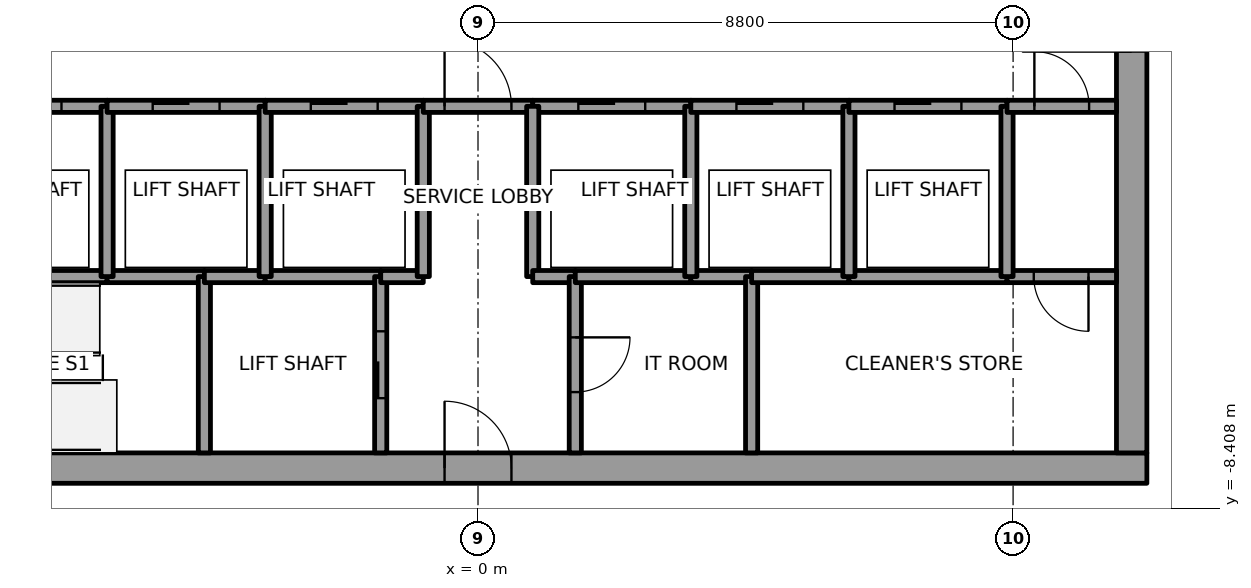
"""IFC4 building model, lengths in metres.
Left out: names, types, materials, properties, quantities, classifications, styles, units other than length and angle.
Written with IfcOpenShell. Run it as: python <this file> out.ifc"""

import sys

from ifc_helpers import new_model, si_unit, direction, frame, frame_2d, origin, place, context, subcontext, project, spatial, rectangle, extrude, element, fill, save


model = new_model("IFC4")
c1 = context("Model", 3, precision=1e-05, world=origin(), true_north=direction((0.0, 1.0)))
c2 = subcontext(c1, "Body", "Model", "MODEL_VIEW")
j1 = project(units=[si_unit("LENGTHUNIT", "METRE"), si_unit("PLANEANGLEUNIT", "RADIAN")], contexts=[c1])
p1 = place(None, origin())
s1 = spatial("IfcSite", under=j1, at=p1, CompositionType="ELEMENT")
p2 = place(p1, origin())
s2 = spatial("IfcBuilding", under=s1, at=p2, CompositionType="ELEMENT")
p3 = place(p2, frame((0.0, 0.0, 315.0)))
s3 = spatial("IfcBuildingStorey", under=s2, at=p3, CompositionType="ELEMENT", Elevation=315.0)
p4 = place(p3, frame((-11.0, -7.75, 0.0), z_axis=(0.0, 0.0, 1.0), x_axis=(1.0, 0.0, 0.0)))
e1 = element("IfcWall", 1, at=p4, inside=s3, PredefinedType="SHEAR", context=c2, shape_type="SweptSolid", body=[
    extrude(rectangle(XDim=22.0, YDim=0.5, at=frame_2d((11.0, 0.0))), origin(), (0.0, 0.0, 1.0), 4.0),
])
p5 = place(p4, frame((10.45, 0.0, 0.0)))
e2 = element("IfcOpeningElement", 2, at=p5, cuts=e1, PredefinedType="OPENING", context=c2, shape_type="SweptSolid", body=[
    extrude(rectangle(XDim=1.1, YDim=2.1, at=frame_2d((0.55, 1.05))), frame((0.0, 0.25, 0.0), z_axis=(0.0, -1.0, 0.0), x_axis=(1.0, 0.0, 0.0)), (0.0, 0.0, 1.0), 0.5),
])
p6 = place(p3, frame((10.75, -7.5, 0.0), z_axis=(0.0, 0.0, 1.0), x_axis=(0.0, 1.0, 0.0)))
e3 = element("IfcWall", 3, at=p6, inside=s3, PredefinedType="SHEAR", context=c2, shape_type="SweptSolid", body=[
    extrude(rectangle(XDim=15.0, YDim=0.5, at=frame_2d((7.5, 0.0))), origin(), (0.0, 0.0, 1.0), 4.0),
])
p7 = place(p6, frame((6.6, 0.0, 0.0)))
e4 = element("IfcOpeningElement", 4, at=p7, cuts=e3, PredefinedType="OPENING", context=c2, shape_type="SweptSolid", body=[
    extrude(rectangle(XDim=1.8, YDim=2.1, at=frame_2d((0.9, 1.05))), frame((0.0, 0.25, 0.0), z_axis=(0.0, -1.0, 0.0), x_axis=(1.0, 0.0, 0.0)), (0.0, 0.0, 1.0), 0.5),
])
p8 = place(p3, frame((-8.7, -4.6, 0.0), z_axis=(0.0, 0.0, 1.0), x_axis=(1.0, 0.0, 0.0)))
e5 = element("IfcWall", 5, at=p8, inside=s3, PredefinedType="SOLIDWALL", context=c2, shape_type="SweptSolid", body=[
    extrude(rectangle(XDim=2.6, YDim=0.2, at=frame_2d((1.3, 0.0))), origin(), (0.0, 0.0, 1.0), 3.85),
])
p9 = place(p3, frame((-8.7, -1.8, 0.0), z_axis=(0.0, 0.0, 1.0), x_axis=(1.0, 0.0, 0.0)))
e6 = element("IfcWall", 6, at=p9, inside=s3, PredefinedType="SOLIDWALL", context=c2, shape_type="SweptSolid", body=[
    extrude(rectangle(XDim=2.6, YDim=0.2, at=frame_2d((1.3, 0.0))), origin(), (0.0, 0.0, 1.0), 3.85),
])
p10 = place(p9, frame((0.75, 0.0, 0.0)))
e7 = element("IfcOpeningElement", 7, at=p10, cuts=e6, PredefinedType="OPENING", context=c2, shape_type="SweptSolid", body=[
    extrude(rectangle(XDim=1.1, YDim=2.1, at=frame_2d((0.55, 1.05))), frame((0.0, 0.1, 0.0), z_axis=(0.0, -1.0, 0.0), x_axis=(1.0, 0.0, 0.0)), (0.0, 0.0, 1.0), 0.2),
])
p11 = place(p3, frame((-6.1, -4.6, 0.0), z_axis=(0.0, 0.0, 1.0), x_axis=(1.0, 0.0, 0.0)))
e8 = element("IfcWall", 8, at=p11, inside=s3, PredefinedType="SOLIDWALL", context=c2, shape_type="SweptSolid", body=[
    extrude(rectangle(XDim=1.6, YDim=0.2, at=frame_2d((0.8, 0.0))), origin(), (0.0, 0.0, 1.0), 3.85),
])
p12 = place(p3, frame((-6.1, -4.6, 0.0), z_axis=(0.0, 0.0, 1.0), x_axis=(0.0, 1.0, 0.0)))
e9 = element("IfcWall", 9, at=p12, inside=s3, PredefinedType="SOLIDWALL", context=c2, shape_type="SweptSolid", body=[
    extrude(rectangle(XDim=2.8, YDim=0.2, at=frame_2d((1.4, 0.0))), origin(), (0.0, 0.0, 1.0), 3.85),
])
p13 = place(p3, frame((-6.1, -1.8, 0.0), z_axis=(0.0, 0.0, 1.0), x_axis=(1.0, 0.0, 0.0)))
e10 = element("IfcWall", 10, at=p13, inside=s3, PredefinedType="SOLIDWALL", context=c2, shape_type="SweptSolid", body=[
    extrude(rectangle(XDim=2.6, YDim=0.2, at=frame_2d((1.3, 0.0))), origin(), (0.0, 0.0, 1.0), 3.85),
])
p14 = place(p13, frame((0.75, 0.0, 0.0)))
e11 = element("IfcOpeningElement", 11, at=p14, cuts=e10, PredefinedType="OPENING", context=c2, shape_type="SweptSolid", body=[
    extrude(rectangle(XDim=1.1, YDim=2.1, at=frame_2d((0.55, 1.05))), frame((0.0, 0.1, 0.0), z_axis=(0.0, -1.0, 0.0), x_axis=(1.0, 0.0, 0.0)), (0.0, 0.0, 1.0), 0.2),
])
p15 = place(p3, frame((-4.5, -4.6, 0.0), z_axis=(0.0, 0.0, 1.0), x_axis=(0.0, -1.0, 0.0)))
e12 = element("IfcWall", 12, at=p15, inside=s3, PredefinedType="SOLIDWALL", context=c2, shape_type="SweptSolid", body=[
    extrude(rectangle(XDim=2.9, YDim=0.2, at=frame_2d((1.45, 0.0))), origin(), (0.0, 0.0, 1.0), 3.85),
])
p16 = place(p3, frame((-4.5, -4.6, 0.0), z_axis=(0.0, 0.0, 1.0), x_axis=(1.0, 0.0, 0.0)))
e13 = element("IfcWall", 13, at=p16, inside=s3, PredefinedType="SOLIDWALL", context=c2, shape_type="SweptSolid", body=[
    extrude(rectangle(XDim=1.0, YDim=0.2, at=frame_2d((0.5, 0.0))), origin(), (0.0, 0.0, 1.0), 3.85),
])
p17 = place(p3, frame((-3.5, -4.6, 0.0), z_axis=(0.0, 0.0, 1.0), x_axis=(1.0, 0.0, 0.0)))
e14 = element("IfcWall", 14, at=p17, inside=s3, PredefinedType="SOLIDWALL", context=c2, shape_type="SweptSolid", body=[
    extrude(rectangle(XDim=1.9, YDim=0.2, at=frame_2d((0.95, 0.0))), origin(), (0.0, 0.0, 1.0), 3.85),
])
p18 = place(p3, frame((-3.5, -4.6, 0.0), z_axis=(0.0, 0.0, 1.0), x_axis=(0.0, 1.0, 0.0)))
e15 = element("IfcWall", 15, at=p18, inside=s3, PredefinedType="SOLIDWALL", context=c2, shape_type="SweptSolid", body=[
    extrude(rectangle(XDim=2.8, YDim=0.2, at=frame_2d((1.4, 0.0))), origin(), (0.0, 0.0, 1.0), 3.85),
])
p19 = place(p3, frame((-3.5, -1.8, 0.0), z_axis=(0.0, 0.0, 1.0), x_axis=(1.0, 0.0, 0.0)))
e16 = element("IfcWall", 16, at=p19, inside=s3, PredefinedType="SOLIDWALL", context=c2, shape_type="SweptSolid", body=[
    extrude(rectangle(XDim=2.6, YDim=0.2, at=frame_2d((1.3, 0.0))), origin(), (0.0, 0.0, 1.0), 3.85),
])
p20 = place(p19, frame((0.75, 0.0, 0.0)))
e17 = element("IfcOpeningElement", 17, at=p20, cuts=e16, PredefinedType="OPENING", context=c2, shape_type="SweptSolid", body=[
    extrude(rectangle(XDim=1.1, YDim=2.1, at=frame_2d((0.55, 1.05))), frame((0.0, 0.1, 0.0), z_axis=(0.0, -1.0, 0.0), x_axis=(1.0, 0.0, 0.0)), (0.0, 0.0, 1.0), 0.2),
])
p21 = place(p3, frame((-1.6, -7.5, 0.0), z_axis=(0.0, 0.0, 1.0), x_axis=(0.0, 1.0, 0.0)))
e18 = element("IfcWall", 18, at=p21, inside=s3, PredefinedType="SOLIDWALL", context=c2, shape_type="SweptSolid", body=[
    extrude(rectangle(XDim=2.9, YDim=0.2, at=frame_2d((1.45, 0.0))), origin(), (0.0, 0.0, 1.0), 3.85),
])
p22 = place(p21, frame((0.9, 0.0, 0.0)))
e19 = element("IfcOpeningElement", 19, at=p22, cuts=e18, PredefinedType="OPENING", context=c2, shape_type="SweptSolid", body=[
    extrude(rectangle(XDim=1.1, YDim=2.1, at=frame_2d((0.55, 1.05))), frame((0.0, 0.1, 0.0), z_axis=(0.0, -1.0, 0.0), x_axis=(1.0, 0.0, 0.0)), (0.0, 0.0, 1.0), 0.2),
])
p23 = place(p3, frame((-1.6, -4.6, 0.0), z_axis=(0.0, 0.0, 1.0), x_axis=(1.0, 0.0, 0.0)))
e20 = element("IfcWall", 20, at=p23, inside=s3, PredefinedType="SOLIDWALL", context=c2, shape_type="SweptSolid", body=[
    extrude(rectangle(XDim=0.7, YDim=0.2, at=frame_2d((0.35, 0.0))), origin(), (0.0, 0.0, 1.0), 3.85),
])
p24 = place(p3, frame((-0.9, -4.6, 0.0), z_axis=(0.0, 0.0, 1.0), x_axis=(0.0, 1.0, 0.0)))
e21 = element("IfcWall", 21, at=p24, inside=s3, PredefinedType="SOLIDWALL", context=c2, shape_type="SweptSolid", body=[
    extrude(rectangle(XDim=2.8, YDim=0.2, at=frame_2d((1.4, 0.0))), origin(), (0.0, 0.0, 1.0), 3.85),
])
p25 = place(p3, frame((-0.9, -1.8, 0.0), z_axis=(0.0, 0.0, 1.0), x_axis=(1.0, 0.0, 0.0)))
e22 = element("IfcWall", 22, at=p25, inside=s3, PredefinedType="SOLIDWALL", context=c2, shape_type="SweptSolid", body=[
    extrude(rectangle(XDim=1.8, YDim=0.2, at=frame_2d((0.9, 0.0))), origin(), (0.0, 0.0, 1.0), 3.85),
])
p26 = place(p25, frame((0.35, 0.0, 0.0)))
e23 = element("IfcOpeningElement", 23, at=p26, cuts=e22, PredefinedType="OPENING", context=c2, shape_type="SweptSolid", body=[
    extrude(rectangle(XDim=1.1, YDim=2.1, at=frame_2d((0.55, 1.05))), frame((0.0, 0.1, 0.0), z_axis=(0.0, -1.0, 0.0), x_axis=(1.0, 0.0, 0.0)), (0.0, 0.0, 1.0), 0.2),
])
p27 = place(p3, frame((0.9, -1.8, 0.0), z_axis=(0.0, 0.0, 1.0), x_axis=(1.0, 0.0, 0.0)))
e24 = element("IfcWall", 24, at=p27, inside=s3, PredefinedType="SOLIDWALL", context=c2, shape_type="SweptSolid", body=[
    extrude(rectangle(XDim=2.6, YDim=0.2, at=frame_2d((1.3, 0.0))), origin(), (0.0, 0.0, 1.0), 3.85),
])
p28 = place(p27, frame((0.75, 0.0, 0.0)))
e25 = element("IfcOpeningElement", 25, at=p28, cuts=e24, PredefinedType="OPENING", context=c2, shape_type="SweptSolid", body=[
    extrude(rectangle(XDim=1.1, YDim=2.1, at=frame_2d((0.55, 1.05))), frame((0.0, 0.1, 0.0), z_axis=(0.0, -1.0, 0.0), x_axis=(1.0, 0.0, 0.0)), (0.0, 0.0, 1.0), 0.2),
])
p29 = place(p3, frame((0.9, -1.8, 0.0), z_axis=(0.0, 0.0, 1.0), x_axis=(0.0, -1.0, 0.0)))
e26 = element("IfcWall", 26, at=p29, inside=s3, PredefinedType="SOLIDWALL", context=c2, shape_type="SweptSolid", body=[
    extrude(rectangle(XDim=2.8, YDim=0.2, at=frame_2d((1.4, 0.0))), origin(), (0.0, 0.0, 1.0), 3.85),
])
p30 = place(p3, frame((0.9, -4.6, 0.0), z_axis=(0.0, 0.0, 1.0), x_axis=(1.0, 0.0, 0.0)))
e27 = element("IfcWall", 27, at=p30, inside=s3, PredefinedType="SOLIDWALL", context=c2, shape_type="SweptSolid", body=[
    extrude(rectangle(XDim=0.7, YDim=0.2, at=frame_2d((0.35, 0.0))), origin(), (0.0, 0.0, 1.0), 3.85),
])
p31 = place(p3, frame((1.6, -4.6, 0.0), z_axis=(0.0, 0.0, 1.0), x_axis=(0.0, -1.0, 0.0)))
e28 = element("IfcWall", 28, at=p31, inside=s3, PredefinedType="SOLIDWALL", context=c2, shape_type="SweptSolid", body=[
    extrude(rectangle(XDim=2.9, YDim=0.2, at=frame_2d((1.45, 0.0))), origin(), (0.0, 0.0, 1.0), 3.85),
])
p32 = place(p31, frame((1.0, 0.0, 0.0)))
e29 = element("IfcOpeningElement", 29, at=p32, cuts=e28, PredefinedType="OPENING", context=c2, shape_type="SweptSolid", body=[
    extrude(rectangle(XDim=0.9, YDim=2.1, at=frame_2d((0.45, 1.05))), frame((0.0, 0.1, 0.0), z_axis=(0.0, -1.0, 0.0), x_axis=(1.0, 0.0, 0.0)), (0.0, 0.0, 1.0), 0.2),
])
p33 = place(p3, frame((3.5, -4.6, 0.0), z_axis=(0.0, 0.0, 1.0), x_axis=(-1.0, 0.0, 0.0)))
e30 = element("IfcWall", 30, at=p33, inside=s3, PredefinedType="SOLIDWALL", context=c2, shape_type="SweptSolid", body=[
    extrude(rectangle(XDim=1.9, YDim=0.2, at=frame_2d((0.95, 0.0))), origin(), (0.0, 0.0, 1.0), 3.85),
])
p34 = place(p3, frame((4.5, -4.6, 0.0), z_axis=(0.0, 0.0, 1.0), x_axis=(-1.0, 0.0, 0.0)))
e31 = element("IfcWall", 31, at=p34, inside=s3, PredefinedType="SOLIDWALL", context=c2, shape_type="SweptSolid", body=[
    extrude(rectangle(XDim=1.0, YDim=0.2, at=frame_2d((0.5, 0.0))), origin(), (0.0, 0.0, 1.0), 3.85),
])
p35 = place(p3, frame((3.5, -4.6, 0.0), z_axis=(0.0, 0.0, 1.0), x_axis=(0.0, 1.0, 0.0)))
e32 = element("IfcWall", 32, at=p35, inside=s3, PredefinedType="SOLIDWALL", context=c2, shape_type="SweptSolid", body=[
    extrude(rectangle(XDim=2.8, YDim=0.2, at=frame_2d((1.4, 0.0))), origin(), (0.0, 0.0, 1.0), 3.85),
])
p36 = place(p3, frame((3.5, -1.8, 0.0), z_axis=(0.0, 0.0, 1.0), x_axis=(1.0, 0.0, 0.0)))
e33 = element("IfcWall", 33, at=p36, inside=s3, PredefinedType="SOLIDWALL", context=c2, shape_type="SweptSolid", body=[
    extrude(rectangle(XDim=2.6, YDim=0.2, at=frame_2d((1.3, 0.0))), origin(), (0.0, 0.0, 1.0), 3.85),
])
p37 = place(p36, frame((0.75, 0.0, 0.0)))
e34 = element("IfcOpeningElement", 34, at=p37, cuts=e33, PredefinedType="OPENING", context=c2, shape_type="SweptSolid", body=[
    extrude(rectangle(XDim=1.1, YDim=2.1, at=frame_2d((0.55, 1.05))), frame((0.0, 0.1, 0.0), z_axis=(0.0, -1.0, 0.0), x_axis=(1.0, 0.0, 0.0)), (0.0, 0.0, 1.0), 0.2),
])
p38 = place(p3, frame((4.5, -4.6, 0.0), z_axis=(0.0, 0.0, 1.0), x_axis=(0.0, -1.0, 0.0)))
e35 = element("IfcWall", 35, at=p38, inside=s3, PredefinedType="SOLIDWALL", context=c2, shape_type="SweptSolid", body=[
    extrude(rectangle(XDim=2.9, YDim=0.2, at=frame_2d((1.45, 0.0))), origin(), (0.0, 0.0, 1.0), 3.85),
])
p39 = place(p3, frame((6.1, -4.6, 0.0), z_axis=(0.0, 0.0, 1.0), x_axis=(-1.0, 0.0, 0.0)))
e36 = element("IfcWall", 36, at=p39, inside=s3, PredefinedType="SOLIDWALL", context=c2, shape_type="SweptSolid", body=[
    extrude(rectangle(XDim=1.6, YDim=0.2, at=frame_2d((0.8, 0.0))), origin(), (0.0, 0.0, 1.0), 3.85),
])
p40 = place(p3, frame((8.7, -4.6, 0.0), z_axis=(0.0, 0.0, 1.0), x_axis=(-1.0, 0.0, 0.0)))
e37 = element("IfcWall", 37, at=p40, inside=s3, PredefinedType="SOLIDWALL", context=c2, shape_type="SweptSolid", body=[
    extrude(rectangle(XDim=2.6, YDim=0.2, at=frame_2d((1.3, 0.0))), origin(), (0.0, 0.0, 1.0), 3.85),
])
p41 = place(p3, frame((6.1, -4.6, 0.0), z_axis=(0.0, 0.0, 1.0), x_axis=(0.0, 1.0, 0.0)))
e38 = element("IfcWall", 38, at=p41, inside=s3, PredefinedType="SOLIDWALL", context=c2, shape_type="SweptSolid", body=[
    extrude(rectangle(XDim=2.8, YDim=0.2, at=frame_2d((1.4, 0.0))), origin(), (0.0, 0.0, 1.0), 3.85),
])
p42 = place(p3, frame((6.1, -1.8, 0.0), z_axis=(0.0, 0.0, 1.0), x_axis=(1.0, 0.0, 0.0)))
e39 = element("IfcWall", 39, at=p42, inside=s3, PredefinedType="SOLIDWALL", context=c2, shape_type="SweptSolid", body=[
    extrude(rectangle(XDim=2.6, YDim=0.2, at=frame_2d((1.3, 0.0))), origin(), (0.0, 0.0, 1.0), 3.85),
])
p43 = place(p42, frame((0.75, 0.0, 0.0)))
e40 = element("IfcOpeningElement", 40, at=p43, cuts=e39, PredefinedType="OPENING", context=c2, shape_type="SweptSolid", body=[
    extrude(rectangle(XDim=1.1, YDim=2.1, at=frame_2d((0.55, 1.05))), frame((0.0, 0.1, 0.0), z_axis=(0.0, -1.0, 0.0), x_axis=(1.0, 0.0, 0.0)), (0.0, 0.0, 1.0), 0.2),
])
p44 = place(p3, frame((10.5, -4.6, 0.0), z_axis=(0.0, 0.0, 1.0), x_axis=(-1.0, 0.0, 0.0)))
e41 = element("IfcWall", 41, at=p44, inside=s3, PredefinedType="SOLIDWALL", context=c2, shape_type="SweptSolid", body=[
    extrude(rectangle(XDim=1.8, YDim=0.2, at=frame_2d((0.9, 0.0))), origin(), (0.0, 0.0, 1.0), 3.85),
])
p45 = place(p44, frame((0.46, 0.0, 0.0)))
e42 = element("IfcOpeningElement", 42, at=p45, cuts=e41, PredefinedType="OPENING", context=c2, shape_type="SweptSolid", body=[
    extrude(rectangle(XDim=0.9, YDim=2.1, at=frame_2d((0.45, 1.05))), frame((0.0, 0.1, 0.0), z_axis=(0.0, -1.0, 0.0), x_axis=(1.0, 0.0, 0.0)), (0.0, 0.0, 1.0), 0.2),
])
p46 = place(p3, frame((8.7, -1.8, 0.0), z_axis=(0.0, 0.0, 1.0), x_axis=(0.0, -1.0, 0.0)))
e43 = element("IfcWall", 43, at=p46, inside=s3, PredefinedType="SOLIDWALL", context=c2, shape_type="SweptSolid", body=[
    extrude(rectangle(XDim=2.8, YDim=0.2, at=frame_2d((1.4, 0.0))), origin(), (0.0, 0.0, 1.0), 3.85),
])
p47 = place(p3, frame((8.7, -1.8, 0.0), z_axis=(0.0, 0.0, 1.0), x_axis=(1.0, 0.0, 0.0)))
e44 = element("IfcWall", 44, at=p47, inside=s3, PredefinedType="SOLIDWALL", context=c2, shape_type="SweptSolid", body=[
    extrude(rectangle(XDim=1.8, YDim=0.2, at=frame_2d((0.9, 0.0))), origin(), (0.0, 0.0, 1.0), 3.85),
])
p48 = place(p47, frame((0.45, 0.0, 0.0)))
e45 = element("IfcOpeningElement", 45, at=p48, cuts=e44, PredefinedType="OPENING", context=c2, shape_type="SweptSolid", body=[
    extrude(rectangle(XDim=0.9, YDim=2.1, at=frame_2d((0.45, 1.05))), frame((0.0, 0.1, 0.0), z_axis=(0.0, -1.0, 0.0), x_axis=(1.0, 0.0, 0.0)), (0.0, 0.0, 1.0), 0.2),
])
p49 = place(p10, origin())
e46 = element("IfcDoor", 46, at=p49, inside=s3, OperationType="SLIDING_TO_RIGHT", PredefinedType="DOOR", context=c2, shape_type="SweptSolid", body=[
    extrude(rectangle(XDim=1.1, YDim=2.1, at=frame_2d((0.55, 1.05))), frame((0.0, 0.025, 0.0), z_axis=(0.0, -1.0, 0.0), x_axis=(1.0, 0.0, 0.0)), (0.0, 0.0, 1.0), 0.05),
])
fill(e7, e46)
p50 = place(p14, origin())
e47 = element("IfcDoor", 47, at=p50, inside=s3, OperationType="SLIDING_TO_RIGHT", PredefinedType="DOOR", context=c2, shape_type="SweptSolid", body=[
    extrude(rectangle(XDim=1.1, YDim=2.1, at=frame_2d((0.55, 1.05))), frame((0.0, 0.025, 0.0), z_axis=(0.0, -1.0, 0.0), x_axis=(1.0, 0.0, 0.0)), (0.0, 0.0, 1.0), 0.05),
])
fill(e11, e47)
p51 = place(p20, origin())
e48 = element("IfcDoor", 48, at=p51, inside=s3, OperationType="SLIDING_TO_RIGHT", PredefinedType="DOOR", context=c2, shape_type="SweptSolid", body=[
    extrude(rectangle(XDim=1.1, YDim=2.1, at=frame_2d((0.55, 1.05))), frame((0.0, 0.025, 0.0), z_axis=(0.0, -1.0, 0.0), x_axis=(1.0, 0.0, 0.0)), (0.0, 0.0, 1.0), 0.05),
])
fill(e17, e48)
p52 = place(p28, origin())
e49 = element("IfcDoor", 49, at=p52, inside=s3, OperationType="SLIDING_TO_LEFT", PredefinedType="DOOR", context=c2, shape_type="SweptSolid", body=[
    extrude(rectangle(XDim=1.1, YDim=2.1, at=frame_2d((0.55, 1.05))), frame((0.0, 0.025, 0.0), z_axis=(0.0, -1.0, 0.0), x_axis=(1.0, 0.0, 0.0)), (0.0, 0.0, 1.0), 0.05),
])
fill(e25, e49)
p53 = place(p37, origin())
e50 = element("IfcDoor", 50, at=p53, inside=s3, OperationType="SLIDING_TO_RIGHT", PredefinedType="DOOR", context=c2, shape_type="SweptSolid", body=[
    extrude(rectangle(XDim=1.1, YDim=2.1, at=frame_2d((0.55, 1.05))), frame((0.0, 0.025, 0.0), z_axis=(0.0, -1.0, 0.0), x_axis=(1.0, 0.0, 0.0)), (0.0, 0.0, 1.0), 0.05),
])
fill(e34, e50)
p54 = place(p43, origin())
e51 = element("IfcDoor", 51, at=p54, inside=s3, OperationType="SLIDING_TO_LEFT", PredefinedType="DOOR", context=c2, shape_type="SweptSolid", body=[
    extrude(rectangle(XDim=1.1, YDim=2.1, at=frame_2d((0.55, 1.05))), frame((0.0, 0.025, 0.0), z_axis=(0.0, -1.0, 0.0), x_axis=(1.0, 0.0, 0.0)), (0.0, 0.0, 1.0), 0.05),
])
fill(e40, e51)
p55 = place(p22, origin())
e52 = element("IfcDoor", 52, at=p55, inside=s3, OperationType="SLIDING_TO_LEFT", PredefinedType="DOOR", context=c2, shape_type="SweptSolid", body=[
    extrude(rectangle(XDim=1.1, YDim=2.1, at=frame_2d((0.55, 1.05))), frame((0.0, 0.025, 0.0), z_axis=(0.0, -1.0, 0.0), x_axis=(1.0, 0.0, 0.0)), (0.0, 0.0, 1.0), 0.05),
])
fill(e19, e52)
p56 = place(p26, origin())
e53 = element("IfcDoor", 53, at=p56, inside=s3, OperationType="SINGLE_SWING_LEFT", PredefinedType="DOOR", context=c2, shape_type="SweptSolid", body=[
    extrude(rectangle(XDim=1.1, YDim=2.1, at=frame_2d((0.55, 1.05))), frame((0.0, 0.025, 0.0), z_axis=(0.0, -1.0, 0.0), x_axis=(1.0, 0.0, 0.0)), (0.0, 0.0, 1.0), 0.05),
])
fill(e23, e53)
p57 = place(p45, origin())
e54 = element("IfcDoor", 54, at=p57, inside=s3, OperationType="SINGLE_SWING_LEFT", PredefinedType="DOOR", context=c2, shape_type="SweptSolid", body=[
    extrude(rectangle(XDim=0.9, YDim=2.1, at=frame_2d((0.45, 1.05))), frame((0.0, 0.025, 0.0), z_axis=(0.0, -1.0, 0.0), x_axis=(1.0, 0.0, 0.0)), (0.0, 0.0, 1.0), 0.05),
])
fill(e42, e54)
p58 = place(p48, origin())
e55 = element("IfcDoor", 55, at=p58, inside=s3, OperationType="SINGLE_SWING_RIGHT", PredefinedType="DOOR", context=c2, shape_type="SweptSolid", body=[
    extrude(rectangle(XDim=0.9, YDim=2.1, at=frame_2d((0.45, 1.05))), frame((0.0, 0.025, 0.0), z_axis=(0.0, -1.0, 0.0), x_axis=(1.0, 0.0, 0.0)), (0.0, 0.0, 1.0), 0.05),
])
fill(e45, e55)
p59 = place(p32, origin())
e56 = element("IfcDoor", 56, at=p59, inside=s3, OperationType="SINGLE_SWING_RIGHT", PredefinedType="DOOR", context=c2, shape_type="SweptSolid", body=[
    extrude(rectangle(XDim=0.9, YDim=2.1, at=frame_2d((0.45, 1.05))), frame((0.0, 0.025, 0.0), z_axis=(0.0, -1.0, 0.0), x_axis=(1.0, 0.0, 0.0)), (0.0, 0.0, 1.0), 0.05),
])
fill(e29, e56)
p60 = place(p7, origin())
e57 = element("IfcDoor", 57, at=p60, inside=s3, OperationType="DOUBLE_DOOR_SINGLE_SWING", PredefinedType="DOOR", context=c2, shape_type="SweptSolid", body=[
    extrude(rectangle(XDim=1.8, YDim=2.1, at=frame_2d((0.9, 1.05))), frame((0.0, 0.025, 0.0), z_axis=(0.0, -1.0, 0.0), x_axis=(1.0, 0.0, 0.0)), (0.0, 0.0, 1.0), 0.05),
])
fill(e4, e57)
p61 = place(p5, origin())
e58 = element("IfcDoor", 58, at=p61, inside=s3, OperationType="SINGLE_SWING_LEFT", PredefinedType="DOOR", context=c2, shape_type="SweptSolid", body=[
    extrude(rectangle(XDim=1.1, YDim=2.1, at=frame_2d((0.55, 1.05))), frame((0.0, 0.025, 0.0), z_axis=(0.0, -1.0, 0.0), x_axis=(1.0, 0.0, 0.0)), (0.0, 0.0, 1.0), 0.05),
])
fill(e2, e58)
save(model, sys.argv[1])
